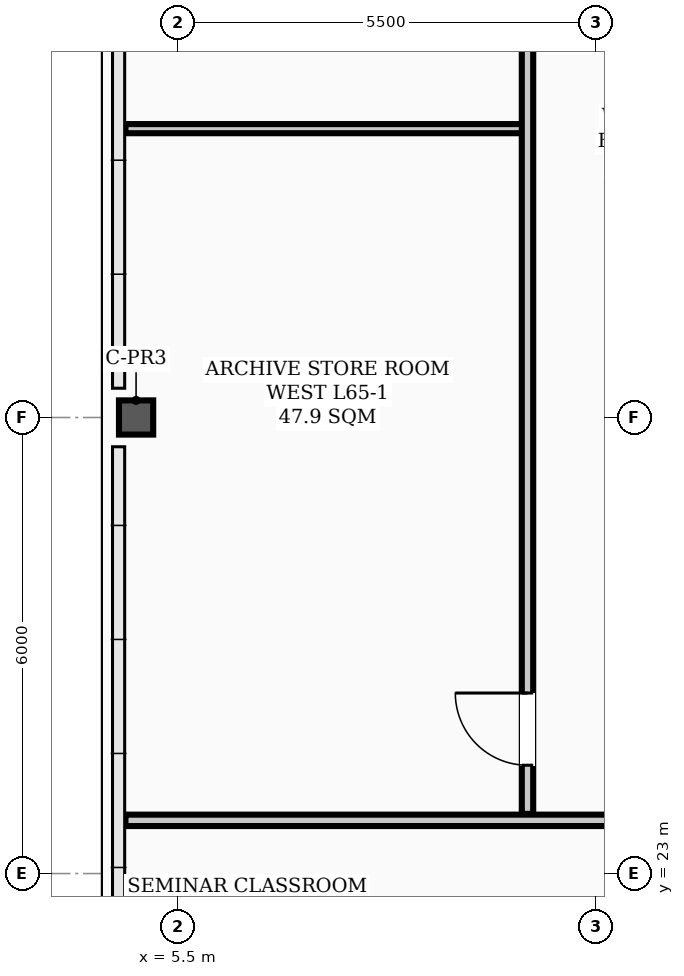
"""IFC4 building model, lengths in metres.
Left out: names, types, materials, properties, quantities, classifications, styles, units other than length and angle.
Written with IfcOpenShell. Run it as: python <this file> out.ifc"""

import sys

from ifc_helpers import new_model, si_unit, direction, frame, frame_2d, origin, origin_2d, place, context, subcontext, project, spatial, rectangle, hollow_rectangle, extrude, element, fill, save


model = new_model("IFC4")
c1 = context("Model", 3, precision=1e-05, world=origin(), true_north=direction((0.0, 1.0)))
c2 = subcontext(c1, "Body", "Model", "MODEL_VIEW")
j1 = project(units=[si_unit("LENGTHUNIT", "METRE"), si_unit("PLANEANGLEUNIT", "RADIAN")], contexts=[c1])
p1 = place(None, origin())
s1 = spatial("IfcSite", under=j1, at=p1, CompositionType="ELEMENT")
p2 = place(p1, origin())
s2 = spatial("IfcBuilding", under=s1, at=p2, CompositionType="ELEMENT")
p3 = place(p2, frame((0.0, 0.0, 261.8)))
s3 = spatial("IfcBuildingStorey", under=s2, at=p3, CompositionType="ELEMENT", Elevation=261.8)
p4 = place(p3, frame((4.95, 29.0, 0.0), z_axis=(0.0, 0.0, 1.0), x_axis=(1.0, 0.0, 0.0)))
e1 = element("IfcColumn", 1, at=p4, inside=s3, PredefinedType="COLUMN", context=c2, shape_type="SweptSolid", body=[
    extrude(hollow_rectangle(XDim=0.45, YDim=0.45, WallThickness=0.022, InnerFilletRadius=0.022, OuterFilletRadius=0.044, at=origin_2d()), origin(), (0.0, 0.0, 1.0), 3.9),
])
p5 = place(p3, frame((4.81, 23.7, 0.0), z_axis=(0.0, 0.0, 1.0), x_axis=(1.0, 0.0, 0.0)))
e2 = element("IfcWall", 2, at=p5, inside=s3, PredefinedType="PARTITIONING", context=c2, shape_type="SweptSolid", body=[
    extrude(rectangle(XDim=40.88, YDim=0.15, at=frame_2d((20.44, 0.0))), origin(), (0.0, 0.0, 1.0), 3.2),
])
p6 = place(p5, frame((10.065, 0.0, 0.0)))
e3 = element("IfcOpeningElement", 3, at=p6, cuts=e2, PredefinedType="OPENING", context=c2, shape_type="SweptSolid", body=[
    extrude(rectangle(XDim=0.95, YDim=2.08, at=frame_2d((0.475, 1.04))), frame((0.0, 0.085, 0.0), z_axis=(0.0, -1.0, 0.0), x_axis=(1.0, 0.0, 0.0)), (0.0, 0.0, 1.0), 0.17),
])
p7 = place(p5, frame((16.415, 0.0, 0.0)))
e4 = element("IfcOpeningElement", 4, at=p7, cuts=e2, PredefinedType="OPENING", context=c2, shape_type="SweptSolid", body=[
    extrude(rectangle(XDim=0.95, YDim=2.08, at=frame_2d((0.475, 1.04))), frame((0.0, 0.085, 0.0), z_axis=(0.0, -1.0, 0.0), x_axis=(1.0, 0.0, 0.0)), (0.0, 0.0, 1.0), 0.17),
])
p8 = place(p5, frame((23.815, 0.0, 0.0)))
e5 = element("IfcOpeningElement", 5, at=p8, cuts=e2, PredefinedType="OPENING", context=c2, shape_type="SweptSolid", body=[
    extrude(rectangle(XDim=0.95, YDim=2.08, at=frame_2d((0.475, 1.04))), frame((0.0, 0.085, 0.0), z_axis=(0.0, -1.0, 0.0), x_axis=(1.0, 0.0, 0.0)), (0.0, 0.0, 1.0), 0.17),
])
p9 = place(p5, frame((35.26, 0.0, 0.0)))
e6 = element("IfcOpeningElement", 6, at=p9, cuts=e2, PredefinedType="OPENING", context=c2, shape_type="SweptSolid", body=[
    extrude(rectangle(XDim=0.95, YDim=2.08, at=frame_2d((0.475, 1.04))), frame((0.0, 0.085, 0.0), z_axis=(0.0, -1.0, 0.0), x_axis=(1.0, 0.0, 0.0)), (0.0, 0.0, 1.0), 0.17),
])
p10 = place(p3, frame((4.81, 32.8, 0.0), z_axis=(0.0, 0.0, 1.0), x_axis=(1.0, 0.0, 0.0)))
e7 = element("IfcWall", 7, at=p10, inside=s3, PredefinedType="PARTITIONING", context=c2, shape_type="SweptSolid", body=[
    extrude(rectangle(XDim=5.29, YDim=0.12, at=frame_2d((2.645, 0.0))), origin(), (0.0, 0.0, 1.0), 3.72),
])
p11 = place(p3, frame((10.1, 23.785, 0.0), z_axis=(0.0, 0.0, 1.0), x_axis=(0.0, 1.0, 0.0)))
e8 = element("IfcWall", 8, at=p11, inside=s3, PredefinedType="PARTITIONING", context=c2, shape_type="SweptSolid", body=[
    extrude(rectangle(XDim=17.88, YDim=0.15, at=frame_2d((8.94, 0.0))), origin(), (0.0, 0.0, 1.0), 3.1),
])
p12 = place(p11, frame((0.64, 0.0, 0.0)))
e9 = element("IfcOpeningElement", 9, at=p12, cuts=e8, PredefinedType="OPENING", context=c2, shape_type="SweptSolid", body=[
    extrude(rectangle(XDim=0.95, YDim=2.08, at=frame_2d((0.475, 1.04))), frame((0.0, 0.085, 0.0), z_axis=(0.0, -1.0, 0.0), x_axis=(1.0, 0.0, 0.0)), (0.0, 0.0, 1.0), 0.17),
])
p13 = place(p11, frame((13.015, 0.0, 0.0)))
e10 = element("IfcOpeningElement", 10, at=p13, cuts=e8, PredefinedType="OPENING", context=c2, shape_type="SweptSolid", body=[
    extrude(rectangle(XDim=0.95, YDim=2.08, at=frame_2d((0.475, 1.04))), frame((0.0, 0.085, 0.0), z_axis=(0.0, -1.0, 0.0), x_axis=(1.0, 0.0, 0.0)), (0.0, 0.0, 1.0), 0.17),
])
p14 = place(p12, origin())
e11 = element("IfcDoor", 11, at=p14, inside=s3, OperationType="SINGLE_SWING_RIGHT", PredefinedType="DOOR", context=c2, shape_type="SweptSolid", body=[
    extrude(rectangle(XDim=0.95, YDim=2.08, at=frame_2d((0.475, 1.04))), frame((0.0, 0.025, 0.0), z_axis=(0.0, -1.0, 0.0), x_axis=(1.0, 0.0, 0.0)), (0.0, 0.0, 1.0), 0.05),
])
fill(e9, e11)
save(model, sys.argv[1])
